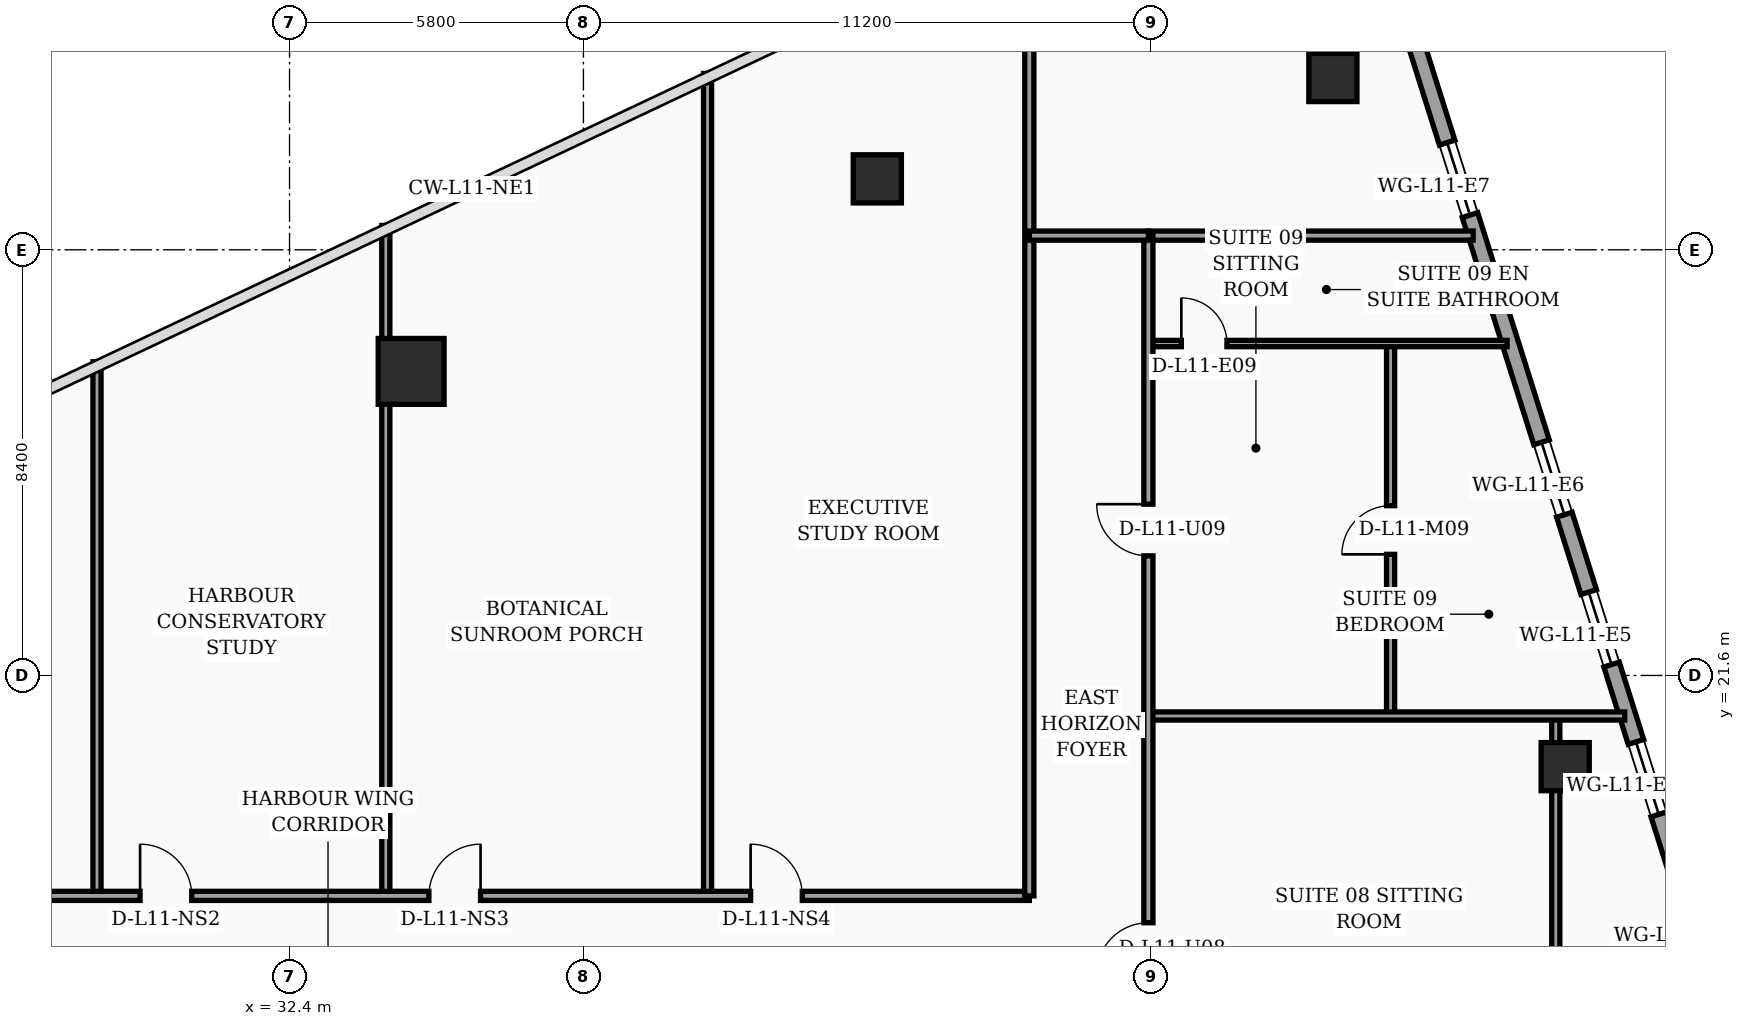
"""IFC4 building model, lengths in metres.
Left out: names, types, materials, properties, quantities, classifications, styles, units other than length and angle.
Written with IfcOpenShell. Run it as: python <this file> out.ifc"""

import sys

from ifc_helpers import new_model, si_unit, direction, frame, frame_2d, origin, origin_2d, place, context, subcontext, project, spatial, rectangle, hollow_rectangle, circle, extrude, element, fill, save


model = new_model("IFC4")
c1 = context("Model", 3, precision=1e-05, world=origin(), true_north=direction((0.0, 1.0)))
c2 = subcontext(c1, "Body", "Model", "MODEL_VIEW")
j1 = project(units=[si_unit("LENGTHUNIT", "METRE"), si_unit("PLANEANGLEUNIT", "RADIAN")], contexts=[c1])
p1 = place(None, origin())
s1 = spatial("IfcSite", under=j1, at=p1, CompositionType="ELEMENT")
p2 = place(p1, origin())
s2 = spatial("IfcBuilding", under=s1, at=p2, CompositionType="ELEMENT")
p3 = place(p2, frame((0.0, 0.0, 50.8)))
s3 = spatial("IfcBuildingStorey", under=s2, at=p3, CompositionType="ELEMENT", Elevation=50.8)
p4 = place(p3, frame((34.8, 27.6, 0.0), z_axis=(0.0, 0.0, 1.0), x_axis=(1.0, 0.0, 0.0)))
e1 = element("IfcColumn", 1, at=p4, inside=s3, PredefinedType="COLUMN", context=c2, shape_type="SweptSolid", body=[
    extrude(circle(Radius=0.65, at=origin_2d()), origin(), (0.0, 0.0, 1.0), 3.56),
])
for number, where, z_axis, x_axis in (
    (2, (44.0, 31.4, 0.0), (0.0, 0.0, 1.0), (1.0, 0.0, 0.0)),
    (3, (57.576, 19.8, 0.0), (0.0, 0.0, 1.0), (1.0, 0.0, 0.0)),
    (4, (52.991, 33.4, 0.0), (0.0, 0.0, 1.0), (1.0, 0.0, 0.0)),
):
    element("IfcColumn", number, at=place(p3, frame(where, z_axis=z_axis, x_axis=x_axis)), inside=s3, PredefinedType="COLUMN", context=c2, shape_type="SweptSolid", body=[
        extrude(hollow_rectangle(XDim=0.95, YDim=0.95, WallThickness=0.04, at=origin_2d()), origin(), (0.0, 0.0, 1.0), 3.56),
    ])
p5 = place(p3, frame((63.63, 5.505, 0.0), z_axis=(0.0, 0.0, 1.0), x_axis=(-0.300501856448, 0.953781229775, 0.0)))
e5 = element("IfcWall", 5, at=p5, inside=s3, PredefinedType="SOLIDWALL", context=c2, shape_type="SweptSolid", body=[
    extrude(rectangle(XDim=30.814, YDim=0.32, at=frame_2d((15.407, 0.0))), origin(), (0.0, 0.0, 1.0), 3.56),
])
p6 = place(p5, frame((4.747, 0.0, 0.0)))
e6 = element("IfcOpeningElement", 6, at=p6, cuts=e5, PredefinedType="OPENING", context=c2, shape_type="SweptSolid", body=[
    extrude(rectangle(XDim=1.4, YDim=2.25, at=frame_2d((0.7, 1.125))), frame((0.0, 0.17, 0.0), z_axis=(0.0, -1.0, 0.0), x_axis=(1.0, 0.0, 0.0)), (0.0, 0.0, 1.0), 0.34),
])
p7 = place(p5, frame((2.65, 0.0, 0.75)))
e7 = element("IfcOpeningElement", 7, at=p7, cuts=e5, PredefinedType="OPENING", context=c2, shape_type="SweptSolid", body=[
    extrude(rectangle(XDim=1.5, YDim=1.6, at=frame_2d((0.75, 0.8))), frame((0.0, 0.17, 0.0), z_axis=(0.0, -1.0, 0.0), x_axis=(1.0, 0.0, 0.0)), (0.0, 0.0, 1.0), 0.34),
])
p8 = place(p5, frame((7.8, 0.0, 0.75)))
e8 = element("IfcOpeningElement", 8, at=p8, cuts=e5, PredefinedType="OPENING", context=c2, shape_type="SweptSolid", body=[
    extrude(rectangle(XDim=1.5, YDim=1.6, at=frame_2d((0.75, 0.8))), frame((0.0, 0.17, 0.0), z_axis=(0.0, -1.0, 0.0), x_axis=(1.0, 0.0, 0.0)), (0.0, 0.0, 1.0), 0.34),
])
p9 = place(p5, frame((10.9, 0.0, 0.75)))
e9 = element("IfcOpeningElement", 9, at=p9, cuts=e5, PredefinedType="OPENING", context=c2, shape_type="SweptSolid", body=[
    extrude(rectangle(XDim=1.5, YDim=1.6, at=frame_2d((0.75, 0.8))), frame((0.0, 0.17, 0.0), z_axis=(0.0, -1.0, 0.0), x_axis=(1.0, 0.0, 0.0)), (0.0, 0.0, 1.0), 0.34),
])
p10 = place(p5, frame((14.0, 0.0, 0.75)))
e10 = element("IfcOpeningElement", 10, at=p10, cuts=e5, PredefinedType="OPENING", context=c2, shape_type="SweptSolid", body=[
    extrude(rectangle(XDim=1.5, YDim=1.6, at=frame_2d((0.75, 0.8))), frame((0.0, 0.17, 0.0), z_axis=(0.0, -1.0, 0.0), x_axis=(1.0, 0.0, 0.0)), (0.0, 0.0, 1.0), 0.34),
])
p11 = place(p5, frame((17.1, 0.0, 0.75)))
e11 = element("IfcOpeningElement", 11, at=p11, cuts=e5, PredefinedType="OPENING", context=c2, shape_type="SweptSolid", body=[
    extrude(rectangle(XDim=1.5, YDim=1.6, at=frame_2d((0.75, 0.8))), frame((0.0, 0.17, 0.0), z_axis=(0.0, -1.0, 0.0), x_axis=(1.0, 0.0, 0.0)), (0.0, 0.0, 1.0), 0.34),
])
p12 = place(p5, frame((20.2, 0.0, 0.75)))
e12 = element("IfcOpeningElement", 12, at=p12, cuts=e5, PredefinedType="OPENING", context=c2, shape_type="SweptSolid", body=[
    extrude(rectangle(XDim=1.5, YDim=1.6, at=frame_2d((0.75, 0.8))), frame((0.0, 0.17, 0.0), z_axis=(0.0, -1.0, 0.0), x_axis=(1.0, 0.0, 0.0)), (0.0, 0.0, 1.0), 0.34),
])
p13 = place(p5, frame((26.4, 0.0, 0.75)))
e13 = element("IfcOpeningElement", 13, at=p13, cuts=e5, PredefinedType="OPENING", context=c2, shape_type="SweptSolid", body=[
    extrude(rectangle(XDim=1.5, YDim=1.6, at=frame_2d((0.75, 0.8))), frame((0.0, 0.17, 0.0), z_axis=(0.0, -1.0, 0.0), x_axis=(1.0, 0.0, 0.0)), (0.0, 0.0, 1.0), 0.34),
])
p14 = place(p3, frame((28.6, 17.25, 0.0), z_axis=(0.0, 0.0, 1.0), x_axis=(0.0, 1.0, 0.0)))
e14 = element("IfcWall", 14, at=p14, inside=s3, PredefinedType="PARTITIONING", context=c2, shape_type="SweptSolid", body=[
    extrude(rectangle(XDim=10.54, YDim=0.16, at=frame_2d((5.27, 0.0))), origin(), (0.0, 0.0, 1.0), 2.84),
])
p15 = place(p3, frame((34.3, 17.25, 0.0), z_axis=(0.0, 0.0, 1.0), x_axis=(0.0, 1.0, 0.0)))
e15 = element("IfcWall", 15, at=p15, inside=s3, PredefinedType="PARTITIONING", context=c2, shape_type="SweptSolid", body=[
    extrude(rectangle(XDim=13.23, YDim=0.16, at=frame_2d((6.615, 0.0))), origin(), (0.0, 0.0, 1.0), 2.84),
])
p16 = place(p3, frame((40.65, 17.25, 0.0), z_axis=(0.0, 0.0, 1.0), x_axis=(0.0, 1.0, 0.0)))
e16 = element("IfcWall", 16, at=p16, inside=s3, PredefinedType="PARTITIONING", context=c2, shape_type="SweptSolid", body=[
    extrude(rectangle(XDim=16.23, YDim=0.16, at=frame_2d((8.115, 0.0))), origin(), (0.0, 0.0, 1.0), 2.84),
])
p17 = place(p3, frame((21.5, 17.25, 0.0), z_axis=(0.0, 0.0, 1.0), x_axis=(1.0, 0.0, 0.0)))
e17 = element("IfcWall", 17, at=p17, inside=s3, PredefinedType="PARTITIONING", context=c2, shape_type="SweptSolid", body=[
    extrude(rectangle(XDim=25.5, YDim=0.18, at=frame_2d((12.75, 0.0))), origin(), (0.0, 0.0, 1.0), 2.84),
])
p18 = place(p17, frame((0.95, 0.0, 0.0)))
e18 = element("IfcOpeningElement", 18, at=p18, cuts=e17, PredefinedType="OPENING", context=c2, shape_type="SweptSolid", body=[
    extrude(rectangle(XDim=1.02, YDim=2.2, at=frame_2d((0.51, 1.1))), frame((0.0, 0.1, 0.0), z_axis=(0.0, -1.0, 0.0), x_axis=(1.0, 0.0, 0.0)), (0.0, 0.0, 1.0), 0.2),
])
p19 = place(p17, frame((7.95, 0.0, 0.0)))
e19 = element("IfcOpeningElement", 19, at=p19, cuts=e17, PredefinedType="OPENING", context=c2, shape_type="SweptSolid", body=[
    extrude(rectangle(XDim=1.02, YDim=2.2, at=frame_2d((0.51, 1.1))), frame((0.0, 0.1, 0.0), z_axis=(0.0, -1.0, 0.0), x_axis=(1.0, 0.0, 0.0)), (0.0, 0.0, 1.0), 0.2),
])
p20 = place(p17, frame((13.65, 0.0, 0.0)))
e20 = element("IfcOpeningElement", 20, at=p20, cuts=e17, PredefinedType="OPENING", context=c2, shape_type="SweptSolid", body=[
    extrude(rectangle(XDim=1.02, YDim=2.2, at=frame_2d((0.51, 1.1))), frame((0.0, 0.1, 0.0), z_axis=(0.0, -1.0, 0.0), x_axis=(1.0, 0.0, 0.0)), (0.0, 0.0, 1.0), 0.2),
])
p21 = place(p17, frame((20.0, 0.0, 0.0)))
e21 = element("IfcOpeningElement", 21, at=p21, cuts=e17, PredefinedType="OPENING", context=c2, shape_type="SweptSolid", body=[
    extrude(rectangle(XDim=1.02, YDim=2.2, at=frame_2d((0.51, 1.1))), frame((0.0, 0.1, 0.0), z_axis=(0.0, -1.0, 0.0), x_axis=(1.0, 0.0, 0.0)), (0.0, 0.0, 1.0), 0.2),
])
p22 = place(p3, frame((47.0, 17.25, 0.0), z_axis=(0.0, 0.0, 1.0), x_axis=(0.0, 1.0, 0.0)))
e22 = element("IfcWall", 22, at=p22, inside=s3, PredefinedType="PARTITIONING", context=c2, shape_type="SweptSolid", body=[
    extrude(rectangle(XDim=19.22, YDim=0.18, at=frame_2d((9.61, 0.0))), origin(), (0.0, 0.0, 1.0), 2.84),
])
p23 = place(p3, frame((57.39, 7.45, 0.0), z_axis=(0.0, 0.0, 1.0), x_axis=(0.0, 1.0, 0.0)))
e23 = element("IfcWall", 23, at=p23, inside=s3, PredefinedType="PARTITIONING", context=c2, shape_type="SweptSolid", body=[
    extrude(rectangle(XDim=13.35, YDim=0.16, at=frame_2d((6.675, 0.0))), origin(), (0.0, 0.0, 1.0), 2.84),
])
p24 = place(p23, frame((6.2, 0.0, 0.0)))
e24 = element("IfcOpeningElement", 24, at=p24, cuts=e23, PredefinedType="OPENING", context=c2, shape_type="SweptSolid", body=[
    extrude(rectangle(XDim=0.96, YDim=2.2, at=frame_2d((0.48, 1.1))), frame((0.0, 0.09, 0.0), z_axis=(0.0, -1.0, 0.0), x_axis=(1.0, 0.0, 0.0)), (0.0, 0.0, 1.0), 0.18),
])
p25 = place(p3, frame((54.13, 20.8, 0.0), z_axis=(0.0, 0.0, 1.0), x_axis=(0.0, 1.0, 0.0)))
e25 = element("IfcWall", 25, at=p25, inside=s3, PredefinedType="PARTITIONING", context=c2, shape_type="SweptSolid", body=[
    extrude(rectangle(XDim=7.35, YDim=0.16, at=frame_2d((3.675, 0.0))), origin(), (0.0, 0.0, 1.0), 3.19),
])
p26 = place(p25, frame((3.19, 0.0, 0.0)))
e26 = element("IfcOpeningElement", 26, at=p26, cuts=e25, PredefinedType="OPENING", context=c2, shape_type="SweptSolid", body=[
    extrude(rectangle(XDim=0.96, YDim=2.2, at=frame_2d((0.48, 1.1))), frame((0.0, 0.09, 0.0), z_axis=(0.0, -1.0, 0.0), x_axis=(1.0, 0.0, 0.0)), (0.0, 0.0, 1.0), 0.18),
])
p27 = place(p3, frame((49.35, 28.15, 0.0), z_axis=(0.0, 0.0, 1.0), x_axis=(1.0, 0.0, 0.0)))
e27 = element("IfcWall", 27, at=p27, inside=s3, PredefinedType="PARTITIONING", context=c2, shape_type="SweptSolid", body=[
    extrude(rectangle(XDim=7.08, YDim=0.125, at=frame_2d((3.54, 0.0))), origin(), (0.0, 0.0, 1.0), 3.04),
])
p28 = place(p27, frame((0.65, 0.0, 0.0)))
e28 = element("IfcOpeningElement", 28, at=p28, cuts=e27, PredefinedType="OPENING", context=c2, shape_type="SweptSolid", body=[
    extrude(rectangle(XDim=0.9, YDim=2.15, at=frame_2d((0.45, 1.075))), frame((0.0, 0.073, 0.0), z_axis=(0.0, -1.0, 0.0), x_axis=(1.0, 0.0, 0.0)), (0.0, 0.0, 1.0), 0.145),
])
p29 = place(p3, frame((49.35, 20.8, 0.0), z_axis=(0.0, 0.0, 1.0), x_axis=(1.0, 0.0, 0.0)))
e29 = element("IfcWall", 29, at=p29, inside=s3, PredefinedType="PARTITIONING", context=c2, shape_type="SweptSolid", body=[
    extrude(rectangle(XDim=9.4, YDim=0.16, at=frame_2d((4.7, 0.0))), origin(), (0.0, 0.0, 1.0), 3.04),
])
p30 = place(p3, frame((49.35, 30.28, 0.0), z_axis=(0.0, 0.0, 1.0), x_axis=(1.0, 0.0, 0.0)))
e30 = element("IfcWall", 30, at=p30, inside=s3, PredefinedType="PARTITIONING", context=c2, shape_type="SweptSolid", body=[
    extrude(rectangle(XDim=6.41, YDim=0.18, at=frame_2d((3.205, 0.0))), origin(), (0.0, 0.0, 1.0), 2.84),
])
p31 = place(p3, frame((49.35, 2.44, 0.0), z_axis=(0.0, 0.0, 1.0), x_axis=(0.0, 1.0, 0.0)))
e31 = element("IfcWall", 31, at=p31, inside=s3, PredefinedType="PARTITIONING", context=c2, shape_type="SweptSolid", body=[
    extrude(rectangle(XDim=27.84, YDim=0.18, at=frame_2d((13.92, 0.0))), origin(), (0.0, 0.0, 1.0), 2.84),
])
p32 = place(p31, frame((13.26, 0.0, 0.0)))
e32 = element("IfcOpeningElement", 32, at=p32, cuts=e31, PredefinedType="OPENING", context=c2, shape_type="SweptSolid", body=[
    extrude(rectangle(XDim=1.02, YDim=2.2, at=frame_2d((0.51, 1.1))), frame((0.0, 0.1, 0.0), z_axis=(0.0, -1.0, 0.0), x_axis=(1.0, 0.0, 0.0)), (0.0, 0.0, 1.0), 0.2),
])
p33 = place(p31, frame((21.52, 0.0, 0.0)))
e33 = element("IfcOpeningElement", 33, at=p33, cuts=e31, PredefinedType="OPENING", context=c2, shape_type="SweptSolid", body=[
    extrude(rectangle(XDim=1.02, YDim=2.2, at=frame_2d((0.51, 1.1))), frame((0.0, 0.1, 0.0), z_axis=(0.0, -1.0, 0.0), x_axis=(1.0, 0.0, 0.0)), (0.0, 0.0, 1.0), 0.2),
])
p34 = place(p3, frame((47.0, 30.28, 0.0), z_axis=(0.0, 0.0, 1.0), x_axis=(1.0, 0.0, 0.0)))
e34 = element("IfcWall", 34, at=p34, inside=s3, PredefinedType="PARTITIONING", context=c2, shape_type="SweptSolid", body=[
    extrude(rectangle(XDim=2.35, YDim=0.18, at=frame_2d((1.175, 0.0))), origin(), (0.0, 0.0, 1.0), 2.84),
])
p35 = place(p10, origin())
e35 = element("IfcWindow", 35, at=p35, inside=s3, PartitioningType="SINGLE_PANEL", PredefinedType="WINDOW", context=c2, shape_type="SweptSolid", body=[
    extrude(rectangle(XDim=1.5, YDim=1.6, at=frame_2d((0.75, 0.8))), frame((0.0, 0.03, 0.0), z_axis=(0.0, -1.0, 0.0), x_axis=(1.0, 0.0, 0.0)), (0.0, 0.0, 1.0), 0.06),
])
fill(e10, e35)
p36 = place(p11, origin())
e36 = element("IfcWindow", 36, at=p36, inside=s3, PartitioningType="SINGLE_PANEL", PredefinedType="WINDOW", context=c2, shape_type="SweptSolid", body=[
    extrude(rectangle(XDim=1.5, YDim=1.6, at=frame_2d((0.75, 0.8))), frame((0.0, 0.03, 0.0), z_axis=(0.0, -1.0, 0.0), x_axis=(1.0, 0.0, 0.0)), (0.0, 0.0, 1.0), 0.06),
])
fill(e11, e36)
p37 = place(p12, origin())
e37 = element("IfcWindow", 37, at=p37, inside=s3, PartitioningType="SINGLE_PANEL", PredefinedType="WINDOW", context=c2, shape_type="SweptSolid", body=[
    extrude(rectangle(XDim=1.5, YDim=1.6, at=frame_2d((0.75, 0.8))), frame((0.0, 0.03, 0.0), z_axis=(0.0, -1.0, 0.0), x_axis=(1.0, 0.0, 0.0)), (0.0, 0.0, 1.0), 0.06),
])
fill(e12, e37)
p38 = place(p13, origin())
e38 = element("IfcWindow", 38, at=p38, inside=s3, PartitioningType="SINGLE_PANEL", PredefinedType="WINDOW", context=c2, shape_type="SweptSolid", body=[
    extrude(rectangle(XDim=1.5, YDim=1.6, at=frame_2d((0.75, 0.8))), frame((0.0, 0.03, 0.0), z_axis=(0.0, -1.0, 0.0), x_axis=(1.0, 0.0, 0.0)), (0.0, 0.0, 1.0), 0.06),
])
fill(e13, e38)
p39 = place(p19, origin())
e39 = element("IfcDoor", 39, at=p39, inside=s3, OperationType="SINGLE_SWING_LEFT", PredefinedType="DOOR", context=c2, shape_type="SweptSolid", body=[
    extrude(rectangle(XDim=1.02, YDim=2.2, at=frame_2d((0.51, 1.1))), frame((0.0, 0.025, 0.0), z_axis=(0.0, -1.0, 0.0), x_axis=(1.0, 0.0, 0.0)), (0.0, 0.0, 1.0), 0.05),
])
fill(e19, e39)
p40 = place(p20, origin())
e40 = element("IfcDoor", 40, at=p40, inside=s3, OperationType="SINGLE_SWING_RIGHT", PredefinedType="DOOR", context=c2, shape_type="SweptSolid", body=[
    extrude(rectangle(XDim=1.02, YDim=2.2, at=frame_2d((0.51, 1.1))), frame((0.0, 0.025, 0.0), z_axis=(0.0, -1.0, 0.0), x_axis=(1.0, 0.0, 0.0)), (0.0, 0.0, 1.0), 0.05),
])
fill(e20, e40)
p41 = place(p21, origin())
e41 = element("IfcDoor", 41, at=p41, inside=s3, OperationType="SINGLE_SWING_LEFT", PredefinedType="DOOR", context=c2, shape_type="SweptSolid", body=[
    extrude(rectangle(XDim=1.02, YDim=2.2, at=frame_2d((0.51, 1.1))), frame((0.0, 0.025, 0.0), z_axis=(0.0, -1.0, 0.0), x_axis=(1.0, 0.0, 0.0)), (0.0, 0.0, 1.0), 0.05),
])
fill(e21, e41)
p42 = place(p26, origin())
e42 = element("IfcDoor", 42, at=p42, inside=s3, OperationType="SINGLE_SWING_LEFT", PredefinedType="DOOR", context=c2, shape_type="SweptSolid", body=[
    extrude(rectangle(XDim=0.96, YDim=2.2, at=frame_2d((0.48, 1.1))), frame((0.0, 0.025, 0.0), z_axis=(0.0, -1.0, 0.0), x_axis=(1.0, 0.0, 0.0)), (0.0, 0.0, 1.0), 0.05),
])
fill(e26, e42)
p43 = place(p28, origin())
e43 = element("IfcDoor", 43, at=p43, inside=s3, OperationType="SINGLE_SWING_LEFT", PredefinedType="DOOR", context=c2, shape_type="SweptSolid", body=[
    extrude(rectangle(XDim=0.9, YDim=2.15, at=frame_2d((0.45, 1.075))), frame((0.0, 0.025, 0.0), z_axis=(0.0, -1.0, 0.0), x_axis=(1.0, 0.0, 0.0)), (0.0, 0.0, 1.0), 0.05),
])
fill(e28, e43)
p44 = place(p32, origin())
e44 = element("IfcDoor", 44, at=p44, inside=s3, OperationType="SINGLE_SWING_LEFT", PredefinedType="DOOR", context=c2, shape_type="SweptSolid", body=[
    extrude(rectangle(XDim=1.02, YDim=2.2, at=frame_2d((0.51, 1.1))), frame((0.0, 0.025, 0.0), z_axis=(0.0, -1.0, 0.0), x_axis=(1.0, 0.0, 0.0)), (0.0, 0.0, 1.0), 0.05),
])
fill(e32, e44)
p45 = place(p33, origin())
e45 = element("IfcDoor", 45, at=p45, inside=s3, OperationType="SINGLE_SWING_RIGHT", PredefinedType="DOOR", context=c2, shape_type="SweptSolid", body=[
    extrude(rectangle(XDim=1.02, YDim=2.2, at=frame_2d((0.51, 1.1))), frame((0.0, 0.025, 0.0), z_axis=(0.0, -1.0, 0.0), x_axis=(1.0, 0.0, 0.0)), (0.0, 0.0, 1.0), 0.05),
])
fill(e33, e45)
save(model, sys.argv[1])
